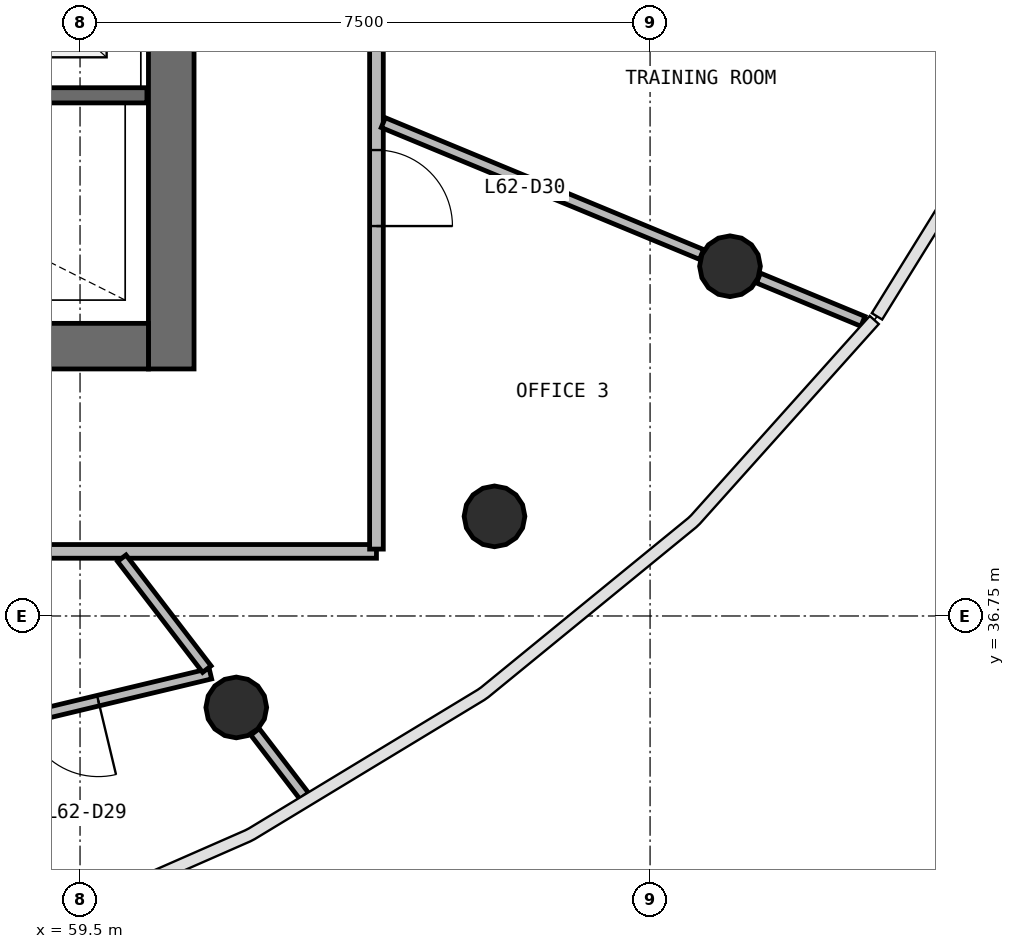
"""IFC4 building model, lengths in metres.
Left out: names, types, materials, properties, quantities, classifications, styles, units other than length and angle.
Written with IfcOpenShell. Run it as: python <this file> out.ifc"""

import sys

from ifc_helpers import new_model, si_unit, direction, frame, frame_2d, origin, origin_2d, place, context, subcontext, project, spatial, rectangle, circle, extrude, source, transform, mapped, element, fill, save


model = new_model("IFC4")
c1 = context("Model", 3, precision=1e-05, world=origin(), true_north=direction((0.0, 1.0)))
c2 = subcontext(c1, "Body", "Model", "MODEL_VIEW")
j1 = project(units=[si_unit("LENGTHUNIT", "METRE"), si_unit("PLANEANGLEUNIT", "RADIAN")], contexts=[c1])
p1 = place(None, origin())
s1 = spatial("IfcSite", under=j1, at=p1, CompositionType="ELEMENT")
p2 = place(p1, origin())
s2 = spatial("IfcBuilding", under=s1, at=p2, CompositionType="ELEMENT")
p3 = place(p2, frame((0.0, 0.0, 254.0)))
s3 = spatial("IfcBuildingStorey", under=s2, at=p3, CompositionType="ELEMENT", Elevation=254.0)
p4 = place(p3, frame((60.7, 40.0, 0.0), z_axis=(0.0, 0.0, 1.0), x_axis=(0.0, 1.0, 0.0)))
e1 = element("IfcWall", 1, at=p4, inside=s3, PredefinedType="SHEAR", context=c2, shape_type="SweptSolid", body=[
    extrude(rectangle(XDim=16.0, YDim=0.6, at=frame_2d((8.0, 0.0))), origin(), (0.0, 0.0, 1.0), 3.9),
])
p5 = place(p4, frame((7.1, 0.0, 0.0)))
e2 = element("IfcOpeningElement", 2, at=p5, cuts=e1, PredefinedType="OPENING", context=c2, shape_type="SweptSolid", body=[
    extrude(rectangle(XDim=1.8, YDim=2.1, at=frame_2d((0.9, 1.05))), frame((0.0, 0.31, 0.0), z_axis=(0.0, -1.0, 0.0), x_axis=(1.0, 0.0, 0.0)), (0.0, 0.0, 1.0), 0.62),
])
p6 = place(p3, frame((43.6, 40.3, 0.0), z_axis=(0.0, 0.0, 1.0), x_axis=(1.0, 0.0, 0.0)))
e3 = element("IfcWall", 3, at=p6, inside=s3, PredefinedType="SHEAR", context=c2, shape_type="SweptSolid", body=[
    extrude(rectangle(XDim=16.8, YDim=0.6, at=frame_2d((8.4, 0.0))), origin(), (0.0, 0.0, 1.0), 3.9),
])
p7 = place(p6, frame((10.3, 0.0, 0.0)))
e4 = element("IfcOpeningElement", 4, at=p7, cuts=e3, PredefinedType="OPENING", context=c2, shape_type="SweptSolid", body=[
    extrude(rectangle(XDim=1.2, YDim=2.1, at=frame_2d((0.6, 1.05))), frame((0.0, 0.31, 0.0), z_axis=(0.0, -1.0, 0.0), x_axis=(1.0, 0.0, 0.0)), (0.0, 0.0, 1.0), 0.62),
])
p8 = place(p6, frame((7.25, 0.0, 0.0)))
e5 = element("IfcOpeningElement", 5, at=p8, cuts=e3, PredefinedType="OPENING", context=c2, shape_type="SweptSolid", body=[
    extrude(rectangle(XDim=1.1, YDim=2.1, at=frame_2d((0.55, 1.05))), frame((0.0, 0.31, 0.0), z_axis=(0.0, -1.0, 0.0), x_axis=(1.0, 0.0, 0.0)), (0.0, 0.0, 1.0), 0.62),
])
p9 = place(p6, frame((0.7, 0.0, 0.0)))
e6 = element("IfcOpeningElement", 6, at=p9, cuts=e3, PredefinedType="OPENING", context=c2, shape_type="SweptSolid", body=[
    extrude(rectangle(XDim=0.8, YDim=2.1, at=frame_2d((0.4, 1.05))), frame((0.0, 0.31, 0.0), z_axis=(0.0, -1.0, 0.0), x_axis=(1.0, 0.0, 0.0)), (0.0, 0.0, 1.0), 0.62),
])
m1 = source(origin(), c2, "Body", "SweptSolid", [
    extrude(circle(Radius=0.4, at=origin_2d()), origin(), (0.0, 0.0, 1.0), 3.9),
])
for number, where, z_axis, x_axis in (
    (7, (61.556, 35.547, 0.0), (0.0, 0.0, 1.0), (1.0, 0.0, 0.0)),
    (8, (64.953, 38.061, 0.0), (0.0, 0.0, 1.0), (1.0, 0.0, 0.0)),
    (9, (68.052, 41.351, 0.0), (0.0, 0.0, 1.0), (1.0, 0.0, 0.0)),
):
    element("IfcColumn", number, at=place(p3, frame(where, z_axis=z_axis, x_axis=x_axis)), inside=s3, PredefinedType="COLUMN", context=c2, shape_type="MappedRepresentation", body=[
        mapped(m1, transform((0.0, 0.0, 0.0), scale=1.0)),
    ])
p10 = place(p3, frame((57.7, 43.6, 0.0), z_axis=(0.0, 0.0, 1.0), x_axis=(1.0, 0.0, 0.0)))
e10 = element("IfcWall", 10, at=p10, inside=s3, PredefinedType="SOLIDWALL", context=c2, shape_type="SweptSolid", body=[
    extrude(rectangle(XDim=2.68, YDim=0.2, at=frame_2d((1.34, 0.0))), origin(), (0.0, 0.0, 1.0), 3.58),
])
p11 = place(p3, frame((63.4, 37.6, 0.0), z_axis=(0.0, 0.0, 1.0), x_axis=(-1.0, 0.0, 0.0)))
e11 = element("IfcWall", 11, at=p11, inside=s3, PredefinedType="PARTITIONING", context=c2, shape_type="SweptSolid", body=[
    extrude(rectangle(XDim=22.8, YDim=0.18, at=frame_2d((11.4, 0.0))), origin(), (0.0, 0.0, 1.0), 2.88),
])
p12 = place(p11, frame((10.95, 0.0, 0.0)))
e12 = element("IfcOpeningElement", 12, at=p12, cuts=e11, PredefinedType="OPENING", context=c2, shape_type="SweptSolid", body=[
    extrude(rectangle(XDim=1.0, YDim=2.1, at=frame_2d((0.5, 1.05))), frame((0.0, 0.1, 0.0), z_axis=(0.0, -1.0, 0.0), x_axis=(1.0, 0.0, 0.0)), (0.0, 0.0, 1.0), 0.2),
])
p13 = place(p11, frame((8.75, 0.0, 0.0)))
e13 = element("IfcOpeningElement", 13, at=p13, cuts=e11, PredefinedType="OPENING", context=c2, shape_type="SweptSolid", body=[
    extrude(rectangle(XDim=1.0, YDim=2.1, at=frame_2d((0.5, 1.05))), frame((0.0, 0.1, 0.0), z_axis=(0.0, -1.0, 0.0), x_axis=(1.0, 0.0, 0.0)), (0.0, 0.0, 1.0), 0.2),
])
p14 = place(p3, frame((63.4, 58.37, 0.0), z_axis=(0.0, 0.0, 1.0), x_axis=(0.0, -1.0, 0.0)))
e14 = element("IfcWall", 14, at=p14, inside=s3, PredefinedType="PARTITIONING", context=c2, shape_type="SweptSolid", body=[
    extrude(rectangle(XDim=20.74, YDim=0.18, at=frame_2d((10.37, 0.0))), origin(), (0.0, 0.0, 1.0), 2.88),
])
p15 = place(p14, frame((15.49, 0.0, 0.0)))
e15 = element("IfcOpeningElement", 15, at=p15, cuts=e14, PredefinedType="OPENING", context=c2, shape_type="SweptSolid", body=[
    extrude(rectangle(XDim=1.0, YDim=2.1, at=frame_2d((0.5, 1.05))), frame((0.0, 0.1, 0.0), z_axis=(0.0, -1.0, 0.0), x_axis=(1.0, 0.0, 0.0)), (0.0, 0.0, 1.0), 0.2),
])
p16 = place(p14, frame((12.09, 0.0, 0.0)))
e16 = element("IfcOpeningElement", 16, at=p16, cuts=e14, PredefinedType="OPENING", context=c2, shape_type="SweptSolid", body=[
    extrude(rectangle(XDim=1.0, YDim=2.1, at=frame_2d((0.5, 1.05))), frame((0.0, 0.1, 0.0), z_axis=(0.0, -1.0, 0.0), x_axis=(1.0, 0.0, 0.0)), (0.0, 0.0, 1.0), 0.2),
])
p17 = place(p14, frame((9.89, 0.0, 0.0)))
e17 = element("IfcOpeningElement", 17, at=p17, cuts=e14, PredefinedType="OPENING", context=c2, shape_type="SweptSolid", body=[
    extrude(rectangle(XDim=1.0, YDim=2.1, at=frame_2d((0.5, 1.05))), frame((0.0, 0.1, 0.0), z_axis=(0.0, -1.0, 0.0), x_axis=(1.0, 0.0, 0.0)), (0.0, 0.0, 1.0), 0.2),
])
p18 = place(p3, frame((63.49, 43.241, 0.0), z_axis=(0.0, 0.0, 1.0), x_axis=(0.923863854318, -0.382721280679, 0.0)))
e18 = element("IfcWall", 18, at=p18, inside=s3, PredefinedType="PARTITIONING", context=c2, shape_type="SweptSolid", body=[
    extrude(rectangle(XDim=4.532, YDim=0.14, at=frame_2d((2.266, 0.0))), origin(), (0.0, 0.0, 1.0), 2.88),
])
p19 = place(p3, frame((61.215, 35.99, 0.0), z_axis=(0.0, 0.0, 1.0), x_axis=(-0.972446486368, -0.233126212921, 0.0)))
e19 = element("IfcWall", 19, at=p19, inside=s3, PredefinedType="PARTITIONING", context=c2, shape_type="SweptSolid", body=[
    extrude(rectangle(XDim=3.967, YDim=0.14, at=frame_2d((1.983, 0.0))), origin(), (0.0, 0.0, 1.0), 2.88),
])
p20 = place(p19, frame((1.517, 0.0, 0.0)))
e20 = element("IfcOpeningElement", 20, at=p20, cuts=e19, PredefinedType="OPENING", context=c2, shape_type="SweptSolid", body=[
    extrude(rectangle(XDim=1.0, YDim=2.1, at=frame_2d((0.5, 1.05))), frame((0.0, 0.08, 0.0), z_axis=(0.0, -1.0, 0.0), x_axis=(1.0, 0.0, 0.0)), (0.0, 0.0, 1.0), 0.16),
])
p21 = place(p3, frame((60.049, 37.51, 0.0), z_axis=(0.0, 0.0, 1.0), x_axis=(0.608715796481, -0.793388353276, 0.0)))
e21 = element("IfcWall", 21, at=p21, inside=s3, PredefinedType="PARTITIONING", context=c2, shape_type="SweptSolid", body=[
    extrude(rectangle(XDim=1.839, YDim=0.14, at=frame_2d((0.919, 0.0))), origin(), (0.0, 0.0, 1.0), 2.88),
])
p22 = place(p3, frame((68.426, 41.196, 0.0), z_axis=(0.0, 0.0, 1.0), x_axis=(0.923870878191, -0.382704325074, 0.0)))
e22 = element("IfcWall", 22, at=p22, inside=s3, PredefinedType="PARTITIONING", context=c2, shape_type="SweptSolid", body=[
    extrude(rectangle(XDim=1.488, YDim=0.14, at=frame_2d((0.744, 0.0))), origin(), (0.0, 0.0, 1.0), 2.88),
])
p23 = place(p3, frame((61.802, 35.226, 0.0), z_axis=(0.0, 0.0, 1.0), x_axis=(0.608691318636, -0.793407132951, 0.0)))
e23 = element("IfcWall", 23, at=p23, inside=s3, PredefinedType="PARTITIONING", context=c2, shape_type="SweptSolid", body=[
    extrude(rectangle(XDim=1.065, YDim=0.14, at=frame_2d((0.533, 0.0))), origin(), (0.0, 0.0, 1.0), 2.88),
])
m2 = source(origin(), c2, "Body", "SweptSolid", [
    extrude(rectangle(XDim=1.0, YDim=2.1, at=frame_2d((0.5, 1.05))), frame((0.0, 0.025, 0.0), z_axis=(0.0, -1.0, 0.0), x_axis=(1.0, 0.0, 0.0)), (0.0, 0.0, 1.0), 0.05),
])
p24 = place(p20, origin())
e24 = element("IfcDoor", 24, at=p24, inside=s3, OperationType="SINGLE_SWING_LEFT", PredefinedType="DOOR", context=c2, shape_type="MappedRepresentation", body=[
    mapped(m2, transform((0.0, 0.0, 0.0), scale=1.0)),
])
fill(e20, e24)
p25 = place(p15, origin())
e25 = element("IfcDoor", 25, at=p25, inside=s3, OperationType="SINGLE_SWING_RIGHT", PredefinedType="DOOR", context=c2, shape_type="MappedRepresentation", body=[
    mapped(m2, transform((0.0, 0.0, 0.0), scale=1.0)),
])
fill(e15, e25)
save(model, sys.argv[1])
